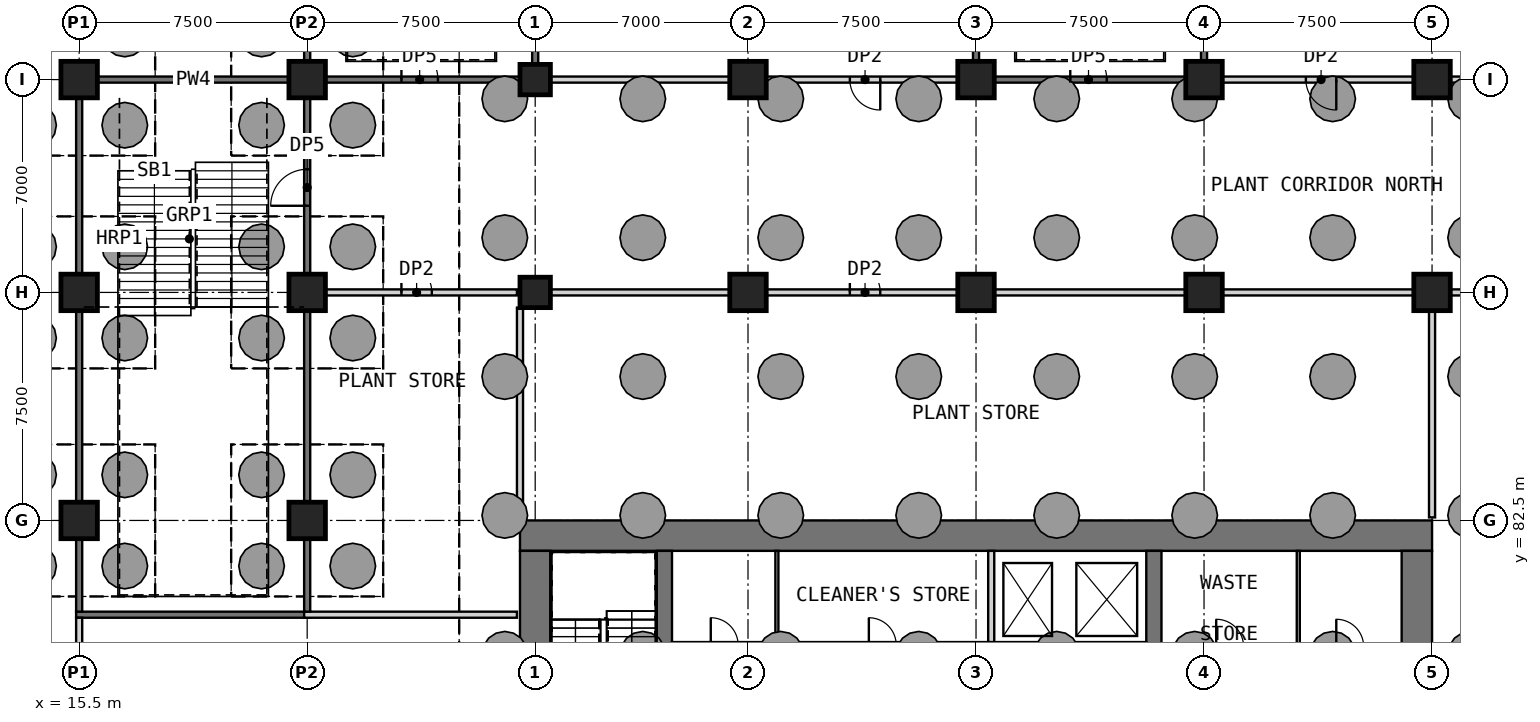
"""IFC4 building model, lengths in metres.
Left out: names, types, materials, properties, quantities, classifications, styles, units other than length and angle.
Written with IfcOpenShell. Run it as: python <this file> out.ifc"""

import sys

from ifc_helpers import new_model, si_unit, direction, frame, frame_2d, origin, origin_2d, place, context, subcontext, project, spatial, rectangle, extrude, element, fill, save


model = new_model("IFC4")
c1 = context("Model", 3, precision=1e-05, world=origin(), true_north=direction((0.0, 1.0)))
c2 = subcontext(c1, "Body", "Model", "MODEL_VIEW")
j1 = project(units=[si_unit("LENGTHUNIT", "METRE"), si_unit("PLANEANGLEUNIT", "RADIAN")], contexts=[c1])
p1 = place(None, origin())
s1 = spatial("IfcSite", under=j1, at=p1, CompositionType="ELEMENT")
p2 = place(p1, origin())
s2 = spatial("IfcBuilding", under=s1, at=p2, CompositionType="ELEMENT")
p3 = place(p2, frame((0.0, 0.0, -12.0)))
s3 = spatial("IfcBuildingStorey", under=s2, at=p3, CompositionType="ELEMENT", Elevation=-12.0)
for number, where, z_axis, x_axis in (
    (1, (30.5, 90.0, 0.0), (0.0, 0.0, 1.0), (1.0, 0.0, 0.0)),
    (2, (30.5, 97.0, 0.0), (0.0, 0.0, 1.0), (1.0, 0.0, 0.0)),
):
    element("IfcColumn", number, at=place(p3, frame(where, z_axis=z_axis, x_axis=x_axis)), inside=s3, PredefinedType="COLUMN", context=c2, shape_type="SweptSolid", body=[
        extrude(rectangle(XDim=1.0, YDim=1.0, at=origin_2d()), origin(), (0.0, 0.0, 1.0), 6.0),
    ])
for number, where, z_axis, x_axis in (
    (3, (37.5, 90.0, 0.0), (0.0, 0.0, 1.0), (1.0, 0.0, 0.0)),
    (4, (37.5, 97.0, 0.0), (0.0, 0.0, 1.0), (1.0, 0.0, 0.0)),
    (5, (45.0, 90.0, 0.0), (0.0, 0.0, 1.0), (1.0, 0.0, 0.0)),
    (6, (45.0, 97.0, 0.0), (0.0, 0.0, 1.0), (1.0, 0.0, 0.0)),
    (7, (52.5, 90.0, 0.0), (0.0, 0.0, 1.0), (1.0, 0.0, 0.0)),
    (8, (52.5, 97.0, 0.0), (0.0, 0.0, 1.0), (1.0, 0.0, 0.0)),
    (9, (60.0, 90.0, 0.0), (0.0, 0.0, 1.0), (1.0, 0.0, 0.0)),
    (10, (60.0, 97.0, 0.0), (0.0, 0.0, 1.0), (1.0, 0.0, 0.0)),
    (11, (15.5, 82.5, 0.0), (0.0, 0.0, 1.0), (1.0, 0.0, 0.0)),
    (12, (15.5, 90.0, 0.0), (0.0, 0.0, 1.0), (1.0, 0.0, 0.0)),
    (13, (15.5, 97.0, 0.0), (0.0, 0.0, 1.0), (1.0, 0.0, 0.0)),
    (14, (23.0, 82.5, 0.0), (0.0, 0.0, 1.0), (1.0, 0.0, 0.0)),
    (15, (23.0, 90.0, 0.0), (0.0, 0.0, 1.0), (1.0, 0.0, 0.0)),
    (16, (23.0, 97.0, 0.0), (0.0, 0.0, 1.0), (1.0, 0.0, 0.0)),
):
    element("IfcColumn", number, at=place(p3, frame(where, z_axis=z_axis, x_axis=x_axis)), inside=s3, PredefinedType="COLUMN", context=c2, shape_type="SweptSolid", body=[
        extrude(rectangle(XDim=1.2, YDim=1.2, at=origin_2d()), origin(), (0.0, 0.0, 1.0), 6.0),
    ])
p4 = place(p3, frame((30.0, 82.0, 0.0), z_axis=(0.0, 0.0, 1.0), x_axis=(1.0, 0.0, 0.0)))
e17 = element("IfcWall", 17, at=p4, inside=s3, PredefinedType="SHEAR", context=c2, shape_type="SweptSolid", body=[
    extrude(rectangle(XDim=30.0, YDim=1.0, at=frame_2d((15.0, 0.0))), origin(), (0.0, 0.0, 1.0), 6.0),
])
p5 = place(p3, frame((30.5, 61.0, 0.0), z_axis=(0.0, 0.0, 1.0), x_axis=(0.0, 1.0, 0.0)))
e18 = element("IfcWall", 18, at=p5, inside=s3, PredefinedType="SHEAR", context=c2, shape_type="SweptSolid", body=[
    extrude(rectangle(XDim=20.5, YDim=1.0, at=frame_2d((10.25, 0.0))), origin(), (0.0, 0.0, 1.0), 6.0),
])
p6 = place(p3, frame((59.5, 61.0, 0.0), z_axis=(0.0, 0.0, 1.0), x_axis=(0.0, 1.0, 0.0)))
e19 = element("IfcWall", 19, at=p6, inside=s3, PredefinedType="SHEAR", context=c2, shape_type="SweptSolid", body=[
    extrude(rectangle(XDim=20.5, YDim=1.0, at=frame_2d((10.25, 0.0))), origin(), (0.0, 0.0, 1.0), 6.0),
])
p7 = place(p6, frame((14.5, 0.0, 0.0)))
e20 = element("IfcOpeningElement", 20, at=p7, cuts=e19, PredefinedType="OPENING", context=c2, shape_type="SweptSolid", body=[
    extrude(rectangle(XDim=1.8, YDim=2.1, at=frame_2d((0.9, 1.05))), frame((0.0, 0.51, 0.0), z_axis=(0.0, -1.0, 0.0), x_axis=(1.0, 0.0, 0.0)), (0.0, 0.0, 1.0), 1.02),
])
for number, where, z_axis, x_axis in (
    (21, (34.75, 78.3, 0.0), (0.0, 0.0, 1.0), (0.0, 1.0, 0.0)),
    (22, (50.85, 78.3, 0.0), (0.0, 0.0, 1.0), (0.0, 1.0, 0.0)),
):
    element("IfcWall", number, at=place(p3, frame(where, z_axis=z_axis, x_axis=x_axis)), inside=s3, PredefinedType="SHEAR", context=c2, shape_type="SweptSolid", body=[
        extrude(rectangle(XDim=3.2, YDim=0.5, at=frame_2d((1.6, 0.0))), origin(), (0.0, 0.0, 1.0), 6.0),
    ])
p8 = place(p3, frame((38.45, 78.5, 0.0), z_axis=(0.0, 0.0, 1.0), x_axis=(0.0, 1.0, 0.0)))
e23 = element("IfcWall", 23, at=p8, inside=s3, PredefinedType="PARTITIONING", context=c2, shape_type="SweptSolid", body=[
    extrude(rectangle(XDim=3.0, YDim=0.1, at=frame_2d((1.5, 0.0))), origin(), (0.0, 0.0, 1.0), 5.4),
])
p9 = place(p3, frame((45.5, 78.5, 0.0), z_axis=(0.0, 0.0, 1.0), x_axis=(0.0, 1.0, 0.0)))
e24 = element("IfcWall", 24, at=p9, inside=s3, PredefinedType="SOLIDWALL", context=c2, shape_type="SweptSolid", body=[
    extrude(rectangle(XDim=3.0, YDim=0.2, at=frame_2d((1.5, 0.0))), origin(), (0.0, 0.0, 1.0), 6.0),
])
p10 = place(p3, frame((55.6, 78.4, 0.0), z_axis=(0.0, 0.0, 1.0), x_axis=(0.0, 1.0, 0.0)))
e25 = element("IfcWall", 25, at=p10, inside=s3, PredefinedType="PARTITIONING", context=c2, shape_type="SweptSolid", body=[
    extrude(rectangle(XDim=3.1, YDim=0.1, at=frame_2d((1.55, 0.0))), origin(), (0.0, 0.0, 1.0), 5.4),
])
p11 = place(p3, frame((23.6, 90.0, 0.0), z_axis=(0.0, 0.0, 1.0), x_axis=(1.0, 0.0, 0.0)))
e26 = element("IfcWall", 26, at=p11, inside=s3, PredefinedType="PARTITIONING", context=c2, shape_type="SweptSolid", body=[
    extrude(rectangle(XDim=6.3, YDim=0.2, at=frame_2d((3.15, 0.0))), origin(), (0.0, 0.0, 1.0), 5.4),
])
p12 = place(p11, frame((2.5, 0.0, 0.0)))
e27 = element("IfcOpeningElement", 27, at=p12, cuts=e26, PredefinedType="OPENING", context=c2, shape_type="SweptSolid", body=[
    extrude(rectangle(XDim=1.0, YDim=2.1, at=frame_2d((0.5, 1.05))), frame((0.0, 0.11, 0.0), z_axis=(0.0, -1.0, 0.0), x_axis=(1.0, 0.0, 0.0)), (0.0, 0.0, 1.0), 0.22),
])
p13 = place(p3, frame((31.0, 90.0, 0.0), z_axis=(0.0, 0.0, 1.0), x_axis=(1.0, 0.0, 0.0)))
e28 = element("IfcWall", 28, at=p13, inside=s3, PredefinedType="PARTITIONING", context=c2, shape_type="SweptSolid", body=[
    extrude(rectangle(XDim=5.9, YDim=0.2, at=frame_2d((2.95, 0.0))), origin(), (0.0, 0.0, 1.0), 5.4),
])
p14 = place(p3, frame((38.1, 90.0, 0.0), z_axis=(0.0, 0.0, 1.0), x_axis=(1.0, 0.0, 0.0)))
e29 = element("IfcWall", 29, at=p14, inside=s3, PredefinedType="PARTITIONING", context=c2, shape_type="SweptSolid", body=[
    extrude(rectangle(XDim=6.3, YDim=0.2, at=frame_2d((3.15, 0.0))), origin(), (0.0, 0.0, 1.0), 5.4),
])
p15 = place(p14, frame((2.75, 0.0, 0.0)))
e30 = element("IfcOpeningElement", 30, at=p15, cuts=e29, PredefinedType="OPENING", context=c2, shape_type="SweptSolid", body=[
    extrude(rectangle(XDim=1.0, YDim=2.1, at=frame_2d((0.5, 1.05))), frame((0.0, 0.11, 0.0), z_axis=(0.0, -1.0, 0.0), x_axis=(1.0, 0.0, 0.0)), (0.0, 0.0, 1.0), 0.22),
])
for number, where, z_axis, x_axis in (
    (31, (45.6, 90.0, 0.0), (0.0, 0.0, 1.0), (1.0, 0.0, 0.0)),
    (32, (53.1, 90.0, 0.0), (0.0, 0.0, 1.0), (1.0, 0.0, 0.0)),
    (33, (60.6, 90.0, 0.0), (0.0, 0.0, 1.0), (1.0, 0.0, 0.0)),
):
    element("IfcWall", number, at=place(p3, frame(where, z_axis=z_axis, x_axis=x_axis)), inside=s3, PredefinedType="PARTITIONING", context=c2, shape_type="SweptSolid", body=[
        extrude(rectangle(XDim=6.3, YDim=0.2, at=frame_2d((3.15, 0.0))), origin(), (0.0, 0.0, 1.0), 5.4),
    ])
p16 = place(p3, frame((16.1, 97.0, 0.0), z_axis=(0.0, 0.0, 1.0), x_axis=(1.0, 0.0, 0.0)))
e34 = element("IfcWall", 34, at=p16, inside=s3, PredefinedType="SHEAR", context=c2, shape_type="SweptSolid", body=[
    extrude(rectangle(XDim=6.3, YDim=0.2, at=frame_2d((3.15, 0.0))), origin(), (0.0, 0.0, 1.0), 5.4),
])
p17 = place(p3, frame((23.6, 97.0, 0.0), z_axis=(0.0, 0.0, 1.0), x_axis=(1.0, 0.0, 0.0)))
e35 = element("IfcWall", 35, at=p17, inside=s3, PredefinedType="SHEAR", context=c2, shape_type="SweptSolid", body=[
    extrude(rectangle(XDim=6.4, YDim=0.2, at=frame_2d((3.2, 0.0))), origin(), (0.0, 0.0, 1.0), 5.4),
])
p18 = place(p17, frame((2.5, 0.0, 0.0)))
e36 = element("IfcOpeningElement", 36, at=p18, cuts=e35, PredefinedType="OPENING", context=c2, shape_type="SweptSolid", body=[
    extrude(rectangle(XDim=1.2, YDim=2.1, at=frame_2d((0.6, 1.05))), frame((0.0, 0.11, 0.0), z_axis=(0.0, -1.0, 0.0), x_axis=(1.0, 0.0, 0.0)), (0.0, 0.0, 1.0), 0.22),
])
p19 = place(p3, frame((31.0, 97.0, 0.0), z_axis=(0.0, 0.0, 1.0), x_axis=(1.0, 0.0, 0.0)))
e37 = element("IfcWall", 37, at=p19, inside=s3, PredefinedType="PARTITIONING", context=c2, shape_type="SweptSolid", body=[
    extrude(rectangle(XDim=5.9, YDim=0.2, at=frame_2d((2.95, 0.0))), origin(), (0.0, 0.0, 1.0), 5.4),
])
p20 = place(p3, frame((44.4, 97.0, 0.0), z_axis=(0.0, 0.0, 1.0), x_axis=(-1.0, 0.0, 0.0)))
e38 = element("IfcWall", 38, at=p20, inside=s3, PredefinedType="PARTITIONING", context=c2, shape_type="SweptSolid", body=[
    extrude(rectangle(XDim=6.3, YDim=0.2, at=frame_2d((3.15, 0.0))), origin(), (0.0, 0.0, 1.0), 5.4),
])
p21 = place(p20, frame((2.55, 0.0, 0.0)))
e39 = element("IfcOpeningElement", 39, at=p21, cuts=e38, PredefinedType="OPENING", context=c2, shape_type="SweptSolid", body=[
    extrude(rectangle(XDim=1.0, YDim=2.1, at=frame_2d((0.5, 1.05))), frame((0.0, 0.11, 0.0), z_axis=(0.0, -1.0, 0.0), x_axis=(1.0, 0.0, 0.0)), (0.0, 0.0, 1.0), 0.22),
])
p22 = place(p3, frame((45.6, 97.0, 0.0), z_axis=(0.0, 0.0, 1.0), x_axis=(1.0, 0.0, 0.0)))
e40 = element("IfcWall", 40, at=p22, inside=s3, PredefinedType="SHEAR", context=c2, shape_type="SweptSolid", body=[
    extrude(rectangle(XDim=6.3, YDim=0.2, at=frame_2d((3.15, 0.0))), origin(), (0.0, 0.0, 1.0), 5.4),
])
p23 = place(p22, frame((2.5, 0.0, 0.0)))
e41 = element("IfcOpeningElement", 41, at=p23, cuts=e40, PredefinedType="OPENING", context=c2, shape_type="SweptSolid", body=[
    extrude(rectangle(XDim=1.2, YDim=2.1, at=frame_2d((0.6, 1.05))), frame((0.0, 0.11, 0.0), z_axis=(0.0, -1.0, 0.0), x_axis=(1.0, 0.0, 0.0)), (0.0, 0.0, 1.0), 0.22),
])
p24 = place(p3, frame((59.4, 97.0, 0.0), z_axis=(0.0, 0.0, 1.0), x_axis=(-1.0, 0.0, 0.0)))
e42 = element("IfcWall", 42, at=p24, inside=s3, PredefinedType="PARTITIONING", context=c2, shape_type="SweptSolid", body=[
    extrude(rectangle(XDim=6.3, YDim=0.2, at=frame_2d((3.15, 0.0))), origin(), (0.0, 0.0, 1.0), 5.4),
])
p25 = place(p24, frame((2.55, 0.0, 0.0)))
e43 = element("IfcOpeningElement", 43, at=p25, cuts=e42, PredefinedType="OPENING", context=c2, shape_type="SweptSolid", body=[
    extrude(rectangle(XDim=1.0, YDim=2.1, at=frame_2d((0.5, 1.05))), frame((0.0, 0.11, 0.0), z_axis=(0.0, -1.0, 0.0), x_axis=(1.0, 0.0, 0.0)), (0.0, 0.0, 1.0), 0.22),
])
p26 = place(p3, frame((60.6, 97.0, 0.0), z_axis=(0.0, 0.0, 1.0), x_axis=(1.0, 0.0, 0.0)))
e44 = element("IfcWall", 44, at=p26, inside=s3, PredefinedType="PARTITIONING", context=c2, shape_type="SweptSolid", body=[
    extrude(rectangle(XDim=6.3, YDim=0.2, at=frame_2d((3.15, 0.0))), origin(), (0.0, 0.0, 1.0), 5.4),
])
p27 = place(p3, frame((15.4, 79.4, 0.0), z_axis=(0.0, 0.0, 1.0), x_axis=(1.0, 0.0, 0.0)))
e45 = element("IfcWall", 45, at=p27, inside=s3, PredefinedType="SHEAR", context=c2, shape_type="SweptSolid", body=[
    extrude(rectangle(XDim=7.7, YDim=0.2, at=frame_2d((3.85, 0.0))), origin(), (0.0, 0.0, 1.0), 5.4),
])
p28 = place(p3, frame((22.9, 79.4, 0.0), z_axis=(0.0, 0.0, 1.0), x_axis=(1.0, 0.0, 0.0)))
e46 = element("IfcWall", 46, at=p28, inside=s3, PredefinedType="PARTITIONING", context=c2, shape_type="SweptSolid", body=[
    extrude(rectangle(XDim=7.0, YDim=0.2, at=frame_2d((3.5, 0.0))), origin(), (0.0, 0.0, 1.0), 5.4),
])
p29 = place(p3, frame((15.5, 75.6, 0.0), z_axis=(0.0, 0.0, 1.0), x_axis=(0.0, 1.0, 0.0)))
e47 = element("IfcWall", 47, at=p29, inside=s3, PredefinedType="PARTITIONING", context=c2, shape_type="SweptSolid", body=[
    extrude(rectangle(XDim=3.7, YDim=0.2, at=frame_2d((1.85, 0.0))), origin(), (0.0, 0.0, 1.0), 5.4),
])
p30 = place(p3, frame((15.5, 79.5, 0.0), z_axis=(0.0, 0.0, 1.0), x_axis=(0.0, 1.0, 0.0)))
e48 = element("IfcWall", 48, at=p30, inside=s3, PredefinedType="SHEAR", context=c2, shape_type="SweptSolid", body=[
    extrude(rectangle(XDim=2.4, YDim=0.2, at=frame_2d((1.2, 0.0))), origin(), (0.0, 0.0, 1.0), 5.4),
])
p31 = place(p3, frame((15.5, 83.1, 0.0), z_axis=(0.0, 0.0, 1.0), x_axis=(0.0, 1.0, 0.0)))
e49 = element("IfcWall", 49, at=p31, inside=s3, PredefinedType="SHEAR", context=c2, shape_type="SweptSolid", body=[
    extrude(rectangle(XDim=6.3, YDim=0.2, at=frame_2d((3.15, 0.0))), origin(), (0.0, 0.0, 1.0), 5.4),
])
p32 = place(p3, frame((15.5, 90.6, 0.0), z_axis=(0.0, 0.0, 1.0), x_axis=(0.0, 1.0, 0.0)))
e50 = element("IfcWall", 50, at=p32, inside=s3, PredefinedType="SHEAR", context=c2, shape_type="SweptSolid", body=[
    extrude(rectangle(XDim=5.8, YDim=0.2, at=frame_2d((2.9, 0.0))), origin(), (0.0, 0.0, 1.0), 5.4),
])
p33 = place(p3, frame((23.0, 79.5, 0.0), z_axis=(0.0, 0.0, 1.0), x_axis=(0.0, 1.0, 0.0)))
e51 = element("IfcWall", 51, at=p33, inside=s3, PredefinedType="SHEAR", context=c2, shape_type="SweptSolid", body=[
    extrude(rectangle(XDim=2.4, YDim=0.2, at=frame_2d((1.2, 0.0))), origin(), (0.0, 0.0, 1.0), 5.4),
])
p34 = place(p3, frame((23.0, 83.1, 0.0), z_axis=(0.0, 0.0, 1.0), x_axis=(0.0, 1.0, 0.0)))
e52 = element("IfcWall", 52, at=p34, inside=s3, PredefinedType="SHEAR", context=c2, shape_type="SweptSolid", body=[
    extrude(rectangle(XDim=6.3, YDim=0.2, at=frame_2d((3.15, 0.0))), origin(), (0.0, 0.0, 1.0), 5.4),
])
p35 = place(p3, frame((23.0, 90.6, 0.0), z_axis=(0.0, 0.0, 1.0), x_axis=(0.0, 1.0, 0.0)))
e53 = element("IfcWall", 53, at=p35, inside=s3, PredefinedType="SHEAR", context=c2, shape_type="SweptSolid", body=[
    extrude(rectangle(XDim=5.8, YDim=0.2, at=frame_2d((2.9, 0.0))), origin(), (0.0, 0.0, 1.0), 5.4),
])
p36 = place(p35, frame((2.25, 0.0, 0.0)))
e54 = element("IfcOpeningElement", 54, at=p36, cuts=e53, PredefinedType="OPENING", context=c2, shape_type="SweptSolid", body=[
    extrude(rectangle(XDim=1.2, YDim=2.1, at=frame_2d((0.6, 1.05))), frame((0.0, 0.11, 0.0), z_axis=(0.0, -1.0, 0.0), x_axis=(1.0, 0.0, 0.0)), (0.0, 0.0, 1.0), 0.22),
])
p37 = place(p3, frame((23.0, 97.6, 0.0), z_axis=(0.0, 0.0, 1.0), x_axis=(0.0, 1.0, 0.0)))
e55 = element("IfcWall", 55, at=p37, inside=s3, PredefinedType="SHEAR", context=c2, shape_type="SweptSolid", body=[
    extrude(rectangle(XDim=6.3, YDim=0.2, at=frame_2d((3.15, 0.0))), origin(), (0.0, 0.0, 1.0), 5.4),
])
for number, where, z_axis, x_axis in (
    (56, (30.5, 97.5, 0.0), (0.0, 0.0, 1.0), (0.0, 1.0, 0.0)),
    (57, (45.0, 97.6, 0.0), (0.0, 0.0, 1.0), (0.0, 1.0, 0.0)),
    (58, (52.5, 97.6, 0.0), (0.0, 0.0, 1.0), (0.0, 1.0, 0.0)),
):
    element("IfcWall", number, at=place(p3, frame(where, z_axis=z_axis, x_axis=x_axis)), inside=s3, PredefinedType="SHEAR", context=c2, shape_type="SweptSolid", body=[
        extrude(rectangle(XDim=6.4, YDim=0.2, at=frame_2d((3.2, 0.0))), origin(), (0.0, 0.0, 1.0), 5.4),
    ])
p38 = place(p3, frame((30.0, 82.6, 0.0), z_axis=(0.0, 0.0, 1.0), x_axis=(0.0, 1.0, 0.0)))
e59 = element("IfcWall", 59, at=p38, inside=s3, PredefinedType="PARTITIONING", context=c2, shape_type="SweptSolid", body=[
    extrude(rectangle(XDim=6.9, YDim=0.2, at=frame_2d((3.45, 0.0))), origin(), (0.0, 0.0, 1.0), 5.4),
])
p39 = place(p3, frame((60.0, 82.6, 0.0), z_axis=(0.0, 0.0, 1.0), x_axis=(0.0, 1.0, 0.0)))
e60 = element("IfcWall", 60, at=p39, inside=s3, PredefinedType="PARTITIONING", context=c2, shape_type="SweptSolid", body=[
    extrude(rectangle(XDim=6.8, YDim=0.2, at=frame_2d((3.4, 0.0))), origin(), (0.0, 0.0, 1.0), 5.4),
])
p40 = place(p12, origin())
e61 = element("IfcDoor", 61, at=p40, inside=s3, OperationType="SINGLE_SWING_LEFT", PredefinedType="DOOR", context=c2, shape_type="SweptSolid", body=[
    extrude(rectangle(XDim=1.0, YDim=2.1, at=frame_2d((0.5, 1.05))), frame((0.0, 0.025, 0.0), z_axis=(0.0, -1.0, 0.0), x_axis=(1.0, 0.0, 0.0)), (0.0, 0.0, 1.0), 0.05),
])
fill(e27, e61)
p41 = place(p15, origin())
e62 = element("IfcDoor", 62, at=p41, inside=s3, OperationType="SINGLE_SWING_LEFT", PredefinedType="DOOR", context=c2, shape_type="SweptSolid", body=[
    extrude(rectangle(XDim=1.0, YDim=2.1, at=frame_2d((0.5, 1.05))), frame((0.0, 0.025, 0.0), z_axis=(0.0, -1.0, 0.0), x_axis=(1.0, 0.0, 0.0)), (0.0, 0.0, 1.0), 0.05),
])
fill(e30, e62)
p42 = place(p18, origin())
e63 = element("IfcDoor", 63, at=p42, inside=s3, OperationType="SINGLE_SWING_LEFT", PredefinedType="DOOR", context=c2, shape_type="SweptSolid", body=[
    extrude(rectangle(XDim=1.2, YDim=2.1, at=frame_2d((0.6, 1.05))), frame((0.0, 0.025, 0.0), z_axis=(0.0, -1.0, 0.0), x_axis=(1.0, 0.0, 0.0)), (0.0, 0.0, 1.0), 0.05),
])
fill(e36, e63)
p43 = place(p21, origin())
e64 = element("IfcDoor", 64, at=p43, inside=s3, OperationType="SINGLE_SWING_LEFT", PredefinedType="DOOR", context=c2, shape_type="SweptSolid", body=[
    extrude(rectangle(XDim=1.0, YDim=2.1, at=frame_2d((0.5, 1.05))), frame((0.0, 0.025, 0.0), z_axis=(0.0, -1.0, 0.0), x_axis=(1.0, 0.0, 0.0)), (0.0, 0.0, 1.0), 0.05),
])
fill(e39, e64)
p44 = place(p23, origin())
e65 = element("IfcDoor", 65, at=p44, inside=s3, OperationType="SINGLE_SWING_LEFT", PredefinedType="DOOR", context=c2, shape_type="SweptSolid", body=[
    extrude(rectangle(XDim=1.2, YDim=2.1, at=frame_2d((0.6, 1.05))), frame((0.0, 0.025, 0.0), z_axis=(0.0, -1.0, 0.0), x_axis=(1.0, 0.0, 0.0)), (0.0, 0.0, 1.0), 0.05),
])
fill(e41, e65)
p45 = place(p25, origin())
e66 = element("IfcDoor", 66, at=p45, inside=s3, OperationType="SINGLE_SWING_LEFT", PredefinedType="DOOR", context=c2, shape_type="SweptSolid", body=[
    extrude(rectangle(XDim=1.0, YDim=2.1, at=frame_2d((0.5, 1.05))), frame((0.0, 0.025, 0.0), z_axis=(0.0, -1.0, 0.0), x_axis=(1.0, 0.0, 0.0)), (0.0, 0.0, 1.0), 0.05),
])
fill(e43, e66)
p46 = place(p36, origin())
e67 = element("IfcDoor", 67, at=p46, inside=s3, OperationType="SINGLE_SWING_LEFT", PredefinedType="DOOR", context=c2, shape_type="SweptSolid", body=[
    extrude(rectangle(XDim=1.2, YDim=2.1, at=frame_2d((0.6, 1.05))), frame((0.0, 0.025, 0.0), z_axis=(0.0, -1.0, 0.0), x_axis=(1.0, 0.0, 0.0)), (0.0, 0.0, 1.0), 0.05),
])
fill(e54, e67)
save(model, sys.argv[1])
